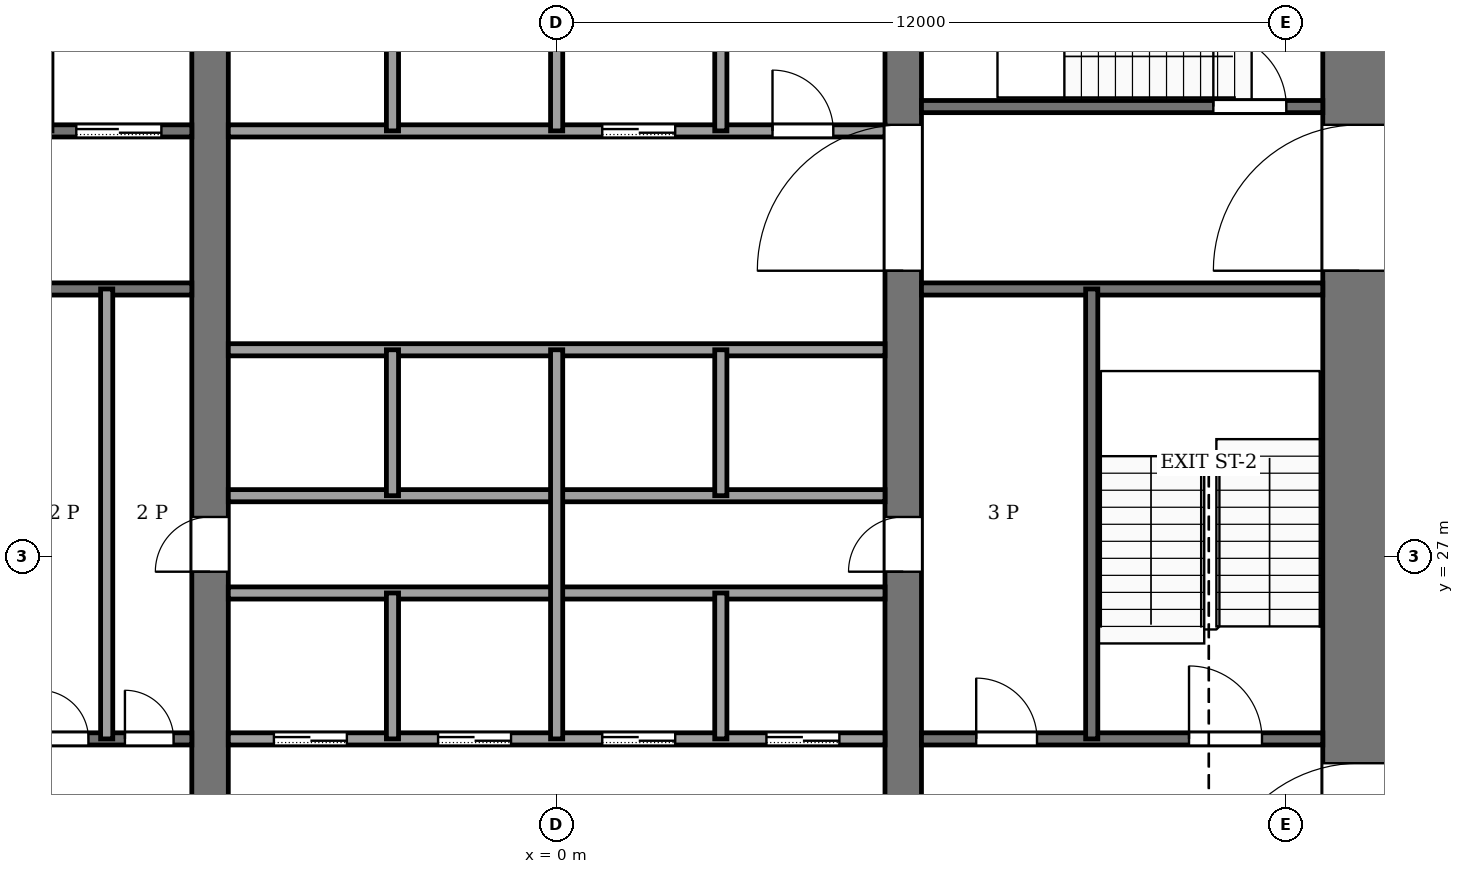
"""IFC4 building model, lengths in metres.
Left out: names, types, materials, properties, quantities, classifications, styles, units other than length and angle.
Written with IfcOpenShell. Run it as: python <this file> out.ifc"""

import sys

from ifc_helpers import new_model, si_unit, direction, frame, frame_2d, origin, place, context, subcontext, project, spatial, rectangle, extrude, element, fill, save


model = new_model("IFC4")
c1 = context("Model", 3, precision=1e-05, world=origin(), true_north=direction((0.0, 1.0)))
c2 = subcontext(c1, "Body", "Model", "MODEL_VIEW")
j1 = project(units=[si_unit("LENGTHUNIT", "METRE"), si_unit("PLANEANGLEUNIT", "RADIAN")], contexts=[c1])
p1 = place(None, origin())
s1 = spatial("IfcSite", under=j1, at=p1, CompositionType="ELEMENT")
p2 = place(p1, origin())
s2 = spatial("IfcBuilding", under=s1, at=p2, CompositionType="ELEMENT")
p3 = place(p2, frame((0.0, 0.0, 90.0)))
s3 = spatial("IfcBuildingStorey", under=s2, at=p3, CompositionType="ELEMENT", Elevation=90.0)
p4 = place(p3, frame((13.2, 18.4, -0.13), z_axis=(0.0, 0.0, 1.0), x_axis=(0.0, 1.0, 0.0)))
e1 = element("IfcWall", 1, at=p4, inside=s3, PredefinedType="SHEAR", context=c2, shape_type="SweptSolid", body=[
    extrude(rectangle(XDim=19.2, YDim=1.2, at=frame_2d((9.6, 0.0))), origin(), (0.0, 0.0, 1.0), 4.0),
])
p5 = place(p4, frame((2.8, 0.0, 0.13)))
e2 = element("IfcOpeningElement", 2, at=p5, cuts=e1, PredefinedType="OPENING", context=c2, shape_type="SweptSolid", body=[
    extrude(rectangle(XDim=2.4, YDim=2.4, at=frame_2d((1.2, 1.2))), frame((0.0, 0.61, 0.0), z_axis=(0.0, -1.0, 0.0), x_axis=(1.0, 0.0, 0.0)), (0.0, 0.0, 1.0), 1.22),
])
p6 = place(p4, frame((13.3, 0.0, 0.13)))
e3 = element("IfcOpeningElement", 3, at=p6, cuts=e1, PredefinedType="OPENING", context=c2, shape_type="SweptSolid", body=[
    extrude(rectangle(XDim=2.4, YDim=2.4, at=frame_2d((1.2, 1.2))), frame((0.0, 0.61, 0.0), z_axis=(0.0, -1.0, 0.0), x_axis=(1.0, 0.0, 0.0)), (0.0, 0.0, 1.0), 1.22),
])
p7 = place(p3, frame((-5.7, 18.4, -0.13), z_axis=(0.0, 0.0, 1.0), x_axis=(0.0, 1.0, 0.0)))
e4 = element("IfcWall", 4, at=p7, inside=s3, PredefinedType="SHEAR", context=c2, shape_type="SweptSolid", body=[
    extrude(rectangle(XDim=19.2, YDim=0.6, at=frame_2d((9.6, 0.0))), origin(), (0.0, 0.0, 1.0), 4.0),
])
p8 = place(p7, frame((8.35, 0.0, 0.13)))
e5 = element("IfcOpeningElement", 5, at=p8, cuts=e4, PredefinedType="OPENING", context=c2, shape_type="SweptSolid", body=[
    extrude(rectangle(XDim=0.9, YDim=2.1, at=frame_2d((0.45, 1.05))), frame((0.0, 0.31, 0.0), z_axis=(0.0, -1.0, 0.0), x_axis=(1.0, 0.0, 0.0)), (0.0, 0.0, 1.0), 0.62),
])
p9 = place(p3, frame((5.7, 18.4, -0.13), z_axis=(0.0, 0.0, 1.0), x_axis=(0.0, 1.0, 0.0)))
e6 = element("IfcWall", 6, at=p9, inside=s3, PredefinedType="SHEAR", context=c2, shape_type="SweptSolid", body=[
    extrude(rectangle(XDim=19.2, YDim=0.6, at=frame_2d((9.6, 0.0))), origin(), (0.0, 0.0, 1.0), 4.0),
])
p10 = place(p9, frame((8.35, 0.0, 0.13)))
e7 = element("IfcOpeningElement", 7, at=p10, cuts=e6, PredefinedType="OPENING", context=c2, shape_type="SweptSolid", body=[
    extrude(rectangle(XDim=0.9, YDim=2.1, at=frame_2d((0.45, 1.05))), frame((0.0, 0.31, 0.0), z_axis=(0.0, -1.0, 0.0), x_axis=(1.0, 0.0, 0.0)), (0.0, 0.0, 1.0), 0.62),
])
p11 = place(p9, frame((13.3, 0.0, 0.13)))
e8 = element("IfcOpeningElement", 8, at=p11, cuts=e6, PredefinedType="OPENING", context=c2, shape_type="SweptSolid", body=[
    extrude(rectangle(XDim=2.4, YDim=2.4, at=frame_2d((1.2, 1.2))), frame((0.0, 0.31, 0.0), z_axis=(0.0, -1.0, 0.0), x_axis=(1.0, 0.0, 0.0)), (0.0, 0.0, 1.0), 0.62),
])
p12 = place(p3, frame((-12.6, 24.0, 0.0), z_axis=(0.0, 0.0, 1.0), x_axis=(1.0, 0.0, 0.0)))
e9 = element("IfcWall", 9, at=p12, inside=s3, PredefinedType="PARTITIONING", context=c2, shape_type="SweptSolid", body=[
    extrude(rectangle(XDim=6.6, YDim=0.2, at=frame_2d((3.3, 0.0))), origin(), (0.0, 0.0, 1.0), 3.87),
])
p13 = place(p12, frame((4.1, 0.0, 0.0)))
e10 = element("IfcOpeningElement", 10, at=p13, cuts=e9, PredefinedType="OPENING", context=c2, shape_type="SweptSolid", body=[
    extrude(rectangle(XDim=0.8, YDim=2.1, at=frame_2d((0.4, 1.05))), frame((0.0, 0.11, 0.0), z_axis=(0.0, -1.0, 0.0), x_axis=(1.0, 0.0, 0.0)), (0.0, 0.0, 1.0), 0.22),
])
p14 = place(p12, frame((5.5, 0.0, 0.0)))
e11 = element("IfcOpeningElement", 11, at=p14, cuts=e9, PredefinedType="OPENING", context=c2, shape_type="SweptSolid", body=[
    extrude(rectangle(XDim=0.8, YDim=2.1, at=frame_2d((0.4, 1.05))), frame((0.0, 0.11, 0.0), z_axis=(0.0, -1.0, 0.0), x_axis=(1.0, 0.0, 0.0)), (0.0, 0.0, 1.0), 0.22),
])
p15 = place(p3, frame((-5.4, 24.0, 0.0), z_axis=(0.0, 0.0, 1.0), x_axis=(1.0, 0.0, 0.0)))
e12 = element("IfcWall", 12, at=p15, inside=s3, PredefinedType="PARTITIONING", context=c2, shape_type="SweptSolid", body=[
    extrude(rectangle(XDim=10.8, YDim=0.2, at=frame_2d((5.4, 0.0))), origin(), (0.0, 0.0, 1.0), 3.87),
])
p16 = place(p15, frame((0.75, 0.0, 0.0)))
e13 = element("IfcOpeningElement", 13, at=p16, cuts=e12, PredefinedType="OPENING", context=c2, shape_type="SweptSolid", body=[
    extrude(rectangle(XDim=1.2, YDim=2.2, at=frame_2d((0.6, 1.1))), frame((0.0, 0.11, 0.0), z_axis=(0.0, -1.0, 0.0), x_axis=(1.0, 0.0, 0.0)), (0.0, 0.0, 1.0), 0.22),
])
p17 = place(p15, frame((3.45, 0.0, 0.0)))
e14 = element("IfcOpeningElement", 14, at=p17, cuts=e12, PredefinedType="OPENING", context=c2, shape_type="SweptSolid", body=[
    extrude(rectangle(XDim=1.2, YDim=2.2, at=frame_2d((0.6, 1.1))), frame((0.0, 0.11, 0.0), z_axis=(0.0, -1.0, 0.0), x_axis=(1.0, 0.0, 0.0)), (0.0, 0.0, 1.0), 0.22),
])
p18 = place(p15, frame((6.15, 0.0, 0.0)))
e15 = element("IfcOpeningElement", 15, at=p18, cuts=e12, PredefinedType="OPENING", context=c2, shape_type="SweptSolid", body=[
    extrude(rectangle(XDim=1.2, YDim=2.2, at=frame_2d((0.6, 1.1))), frame((0.0, 0.11, 0.0), z_axis=(0.0, -1.0, 0.0), x_axis=(1.0, 0.0, 0.0)), (0.0, 0.0, 1.0), 0.22),
])
p19 = place(p15, frame((8.85, 0.0, 0.0)))
e16 = element("IfcOpeningElement", 16, at=p19, cuts=e12, PredefinedType="OPENING", context=c2, shape_type="SweptSolid", body=[
    extrude(rectangle(XDim=1.2, YDim=2.2, at=frame_2d((0.6, 1.1))), frame((0.0, 0.11, 0.0), z_axis=(0.0, -1.0, 0.0), x_axis=(1.0, 0.0, 0.0)), (0.0, 0.0, 1.0), 0.22),
])
p20 = place(p3, frame((6.0, 24.0, 0.0), z_axis=(0.0, 0.0, 1.0), x_axis=(1.0, 0.0, 0.0)))
e17 = element("IfcWall", 17, at=p20, inside=s3, PredefinedType="PARTITIONING", context=c2, shape_type="SweptSolid", body=[
    extrude(rectangle(XDim=6.6, YDim=0.2, at=frame_2d((3.3, 0.0))), origin(), (0.0, 0.0, 1.0), 3.87),
])
p21 = place(p20, frame((0.9, 0.0, 0.0)))
e18 = element("IfcOpeningElement", 18, at=p21, cuts=e17, PredefinedType="OPENING", context=c2, shape_type="SweptSolid", body=[
    extrude(rectangle(XDim=1.0, YDim=2.1, at=frame_2d((0.5, 1.05))), frame((0.0, 0.11, 0.0), z_axis=(0.0, -1.0, 0.0), x_axis=(1.0, 0.0, 0.0)), (0.0, 0.0, 1.0), 0.22),
])
p22 = place(p20, frame((4.4, 0.0, 0.0)))
e19 = element("IfcOpeningElement", 19, at=p22, cuts=e17, PredefinedType="OPENING", context=c2, shape_type="SweptSolid", body=[
    extrude(rectangle(XDim=1.2, YDim=2.2, at=frame_2d((0.6, 1.1))), frame((0.0, 0.11, 0.0), z_axis=(0.0, -1.0, 0.0), x_axis=(1.0, 0.0, 0.0)), (0.0, 0.0, 1.0), 0.22),
])
for number, where, z_axis, x_axis in (
    (20, (-5.4, 26.4, 0.0), (0.0, 0.0, 1.0), (1.0, 0.0, 0.0)),
    (21, (-5.4, 28.0, 0.0), (0.0, 0.0, 1.0), (1.0, 0.0, 0.0)),
    (22, (-5.4, 30.4, 0.0), (0.0, 0.0, 1.0), (1.0, 0.0, 0.0)),
):
    element("IfcWall", number, at=place(p3, frame(where, z_axis=z_axis, x_axis=x_axis)), inside=s3, PredefinedType="PARTITIONING", context=c2, shape_type="SweptSolid", body=[
        extrude(rectangle(XDim=10.8, YDim=0.2, at=frame_2d((5.4, 0.0))), origin(), (0.0, 0.0, 1.0), 3.87),
    ])
p23 = place(p3, frame((-12.6, 31.4, 0.0), z_axis=(0.0, 0.0, 1.0), x_axis=(1.0, 0.0, 0.0)))
e23 = element("IfcWall", 23, at=p23, inside=s3, PredefinedType="PARTITIONING", context=c2, shape_type="SweptSolid", body=[
    extrude(rectangle(XDim=6.6, YDim=0.2, at=frame_2d((3.3, 0.0))), origin(), (0.0, 0.0, 1.0), 3.87),
])
p24 = place(p23, frame((1.0, 0.0, 0.0)))
e24 = element("IfcOpeningElement", 24, at=p24, cuts=e23, PredefinedType="OPENING", context=c2, shape_type="SweptSolid", body=[
    extrude(rectangle(XDim=1.2, YDim=2.2, at=frame_2d((0.6, 1.1))), frame((0.0, 0.11, 0.0), z_axis=(0.0, -1.0, 0.0), x_axis=(1.0, 0.0, 0.0)), (0.0, 0.0, 1.0), 0.22),
])
p25 = place(p3, frame((6.0, 31.4, 0.0), z_axis=(0.0, 0.0, 1.0), x_axis=(1.0, 0.0, 0.0)))
e25 = element("IfcWall", 25, at=p25, inside=s3, PredefinedType="PARTITIONING", context=c2, shape_type="SweptSolid", body=[
    extrude(rectangle(XDim=6.6, YDim=0.2, at=frame_2d((3.3, 0.0))), origin(), (0.0, 0.0, 1.0), 3.87),
])
p26 = place(p3, frame((-12.6, 34.0, 0.0), z_axis=(0.0, 0.0, 1.0), x_axis=(1.0, 0.0, 0.0)))
e26 = element("IfcWall", 26, at=p26, inside=s3, PredefinedType="PARTITIONING", context=c2, shape_type="SweptSolid", body=[
    extrude(rectangle(XDim=6.6, YDim=0.2, at=frame_2d((3.3, 0.0))), origin(), (0.0, 0.0, 1.0), 3.87),
])
p27 = place(p26, frame((4.7, 0.0, 0.0)))
e27 = element("IfcOpeningElement", 27, at=p27, cuts=e26, PredefinedType="OPENING", context=c2, shape_type="SweptSolid", body=[
    extrude(rectangle(XDim=1.4, YDim=2.2, at=frame_2d((0.7, 1.1))), frame((0.0, 0.11, 0.0), z_axis=(0.0, -1.0, 0.0), x_axis=(1.0, 0.0, 0.0)), (0.0, 0.0, 1.0), 0.22),
])
p28 = place(p26, frame((2.3, 0.0, 0.0)))
e28 = element("IfcOpeningElement", 28, at=p28, cuts=e26, PredefinedType="OPENING", context=c2, shape_type="SweptSolid", body=[
    extrude(rectangle(XDim=1.4, YDim=2.2, at=frame_2d((0.7, 1.1))), frame((0.0, 0.11, 0.0), z_axis=(0.0, -1.0, 0.0), x_axis=(1.0, 0.0, 0.0)), (0.0, 0.0, 1.0), 0.22),
])
p29 = place(p26, frame((0.45, 0.0, 0.0)))
e29 = element("IfcOpeningElement", 29, at=p29, cuts=e26, PredefinedType="OPENING", context=c2, shape_type="SweptSolid", body=[
    extrude(rectangle(XDim=0.9, YDim=2.1, at=frame_2d((0.45, 1.05))), frame((0.0, 0.11, 0.0), z_axis=(0.0, -1.0, 0.0), x_axis=(1.0, 0.0, 0.0)), (0.0, 0.0, 1.0), 0.22),
])
p30 = place(p3, frame((-5.4, 34.0, 0.0), z_axis=(0.0, 0.0, 1.0), x_axis=(1.0, 0.0, 0.0)))
e30 = element("IfcWall", 30, at=p30, inside=s3, PredefinedType="PARTITIONING", context=c2, shape_type="SweptSolid", body=[
    extrude(rectangle(XDim=10.8, YDim=0.2, at=frame_2d((5.4, 0.0))), origin(), (0.0, 0.0, 1.0), 3.87),
])
p31 = place(p30, frame((6.15, 0.0, 0.0)))
e31 = element("IfcOpeningElement", 31, at=p31, cuts=e30, PredefinedType="OPENING", context=c2, shape_type="SweptSolid", body=[
    extrude(rectangle(XDim=1.2, YDim=2.2, at=frame_2d((0.6, 1.1))), frame((0.0, 0.11, 0.0), z_axis=(0.0, -1.0, 0.0), x_axis=(1.0, 0.0, 0.0)), (0.0, 0.0, 1.0), 0.22),
])
p32 = place(p30, frame((8.95, 0.0, 0.0)))
e32 = element("IfcOpeningElement", 32, at=p32, cuts=e30, PredefinedType="OPENING", context=c2, shape_type="SweptSolid", body=[
    extrude(rectangle(XDim=1.0, YDim=2.1, at=frame_2d((0.5, 1.05))), frame((0.0, 0.11, 0.0), z_axis=(0.0, -1.0, 0.0), x_axis=(1.0, 0.0, 0.0)), (0.0, 0.0, 1.0), 0.22),
])
p33 = place(p3, frame((6.0, 34.4, 0.0), z_axis=(0.0, 0.0, 1.0), x_axis=(1.0, 0.0, 0.0)))
e33 = element("IfcWall", 33, at=p33, inside=s3, PredefinedType="PARTITIONING", context=c2, shape_type="SweptSolid", body=[
    extrude(rectangle(XDim=6.6, YDim=0.2, at=frame_2d((3.3, 0.0))), origin(), (0.0, 0.0, 1.0), 3.87),
])
p34 = place(p33, frame((4.8, 0.0, 0.0)))
e34 = element("IfcOpeningElement", 34, at=p34, cuts=e33, PredefinedType="OPENING", context=c2, shape_type="SweptSolid", body=[
    extrude(rectangle(XDim=1.2, YDim=2.2, at=frame_2d((0.6, 1.1))), frame((0.0, 0.11, 0.0), z_axis=(0.0, -1.0, 0.0), x_axis=(1.0, 0.0, 0.0)), (0.0, 0.0, 1.0), 0.22),
])
p35 = place(p3, frame((-8.4, 34.0, 0.0), z_axis=(0.0, 0.0, 1.0), x_axis=(0.0, 1.0, 0.0)))
e35 = element("IfcWall", 35, at=p35, inside=s3, PredefinedType="PARTITIONING", context=c2, shape_type="SweptSolid", body=[
    extrude(rectangle(XDim=3.6, YDim=0.2, at=frame_2d((1.8, 0.0))), origin(), (0.0, 0.0, 1.0), 3.87),
])
p36 = place(p3, frame((-7.4, 24.0, 0.0), z_axis=(0.0, 0.0, 1.0), x_axis=(0.0, 1.0, 0.0)))
e36 = element("IfcWall", 36, at=p36, inside=s3, PredefinedType="PARTITIONING", context=c2, shape_type="SweptSolid", body=[
    extrude(rectangle(XDim=7.4, YDim=0.2, at=frame_2d((3.7, 0.0))), origin(), (0.0, 0.0, 1.0), 3.87),
])
for number, where, z_axis, x_axis in (
    (37, (-2.7, 24.0, 0.0), (0.0, 0.0, 1.0), (0.0, 1.0, 0.0)),
    (38, (-2.7, 28.0, 0.0), (0.0, 0.0, 1.0), (0.0, 1.0, 0.0)),
):
    element("IfcWall", number, at=place(p3, frame(where, z_axis=z_axis, x_axis=x_axis)), inside=s3, PredefinedType="PARTITIONING", context=c2, shape_type="SweptSolid", body=[
        extrude(rectangle(XDim=2.4, YDim=0.2, at=frame_2d((1.2, 0.0))), origin(), (0.0, 0.0, 1.0), 3.87),
    ])
p37 = place(p3, frame((-2.7, 34.0, 0.0), z_axis=(0.0, 0.0, 1.0), x_axis=(0.0, 1.0, 0.0)))
e39 = element("IfcWall", 39, at=p37, inside=s3, PredefinedType="PARTITIONING", context=c2, shape_type="SweptSolid", body=[
    extrude(rectangle(XDim=3.6, YDim=0.2, at=frame_2d((1.8, 0.0))), origin(), (0.0, 0.0, 1.0), 3.87),
])
p38 = place(p3, frame((0.0, 24.0, 0.0), z_axis=(0.0, 0.0, 1.0), x_axis=(0.0, 1.0, 0.0)))
e40 = element("IfcWall", 40, at=p38, inside=s3, PredefinedType="PARTITIONING", context=c2, shape_type="SweptSolid", body=[
    extrude(rectangle(XDim=6.4, YDim=0.2, at=frame_2d((3.2, 0.0))), origin(), (0.0, 0.0, 1.0), 3.87),
])
p39 = place(p3, frame((0.0, 34.0, 0.0), z_axis=(0.0, 0.0, 1.0), x_axis=(0.0, 1.0, 0.0)))
e41 = element("IfcWall", 41, at=p39, inside=s3, PredefinedType="PARTITIONING", context=c2, shape_type="SweptSolid", body=[
    extrude(rectangle(XDim=3.6, YDim=0.2, at=frame_2d((1.8, 0.0))), origin(), (0.0, 0.0, 1.0), 3.87),
])
for number, where, z_axis, x_axis in (
    (42, (2.7, 24.0, 0.0), (0.0, 0.0, 1.0), (0.0, 1.0, 0.0)),
    (43, (2.7, 28.0, 0.0), (0.0, 0.0, 1.0), (0.0, 1.0, 0.0)),
):
    element("IfcWall", number, at=place(p3, frame(where, z_axis=z_axis, x_axis=x_axis)), inside=s3, PredefinedType="PARTITIONING", context=c2, shape_type="SweptSolid", body=[
        extrude(rectangle(XDim=2.4, YDim=0.2, at=frame_2d((1.2, 0.0))), origin(), (0.0, 0.0, 1.0), 3.87),
    ])
p40 = place(p3, frame((2.7, 34.0, 0.0), z_axis=(0.0, 0.0, 1.0), x_axis=(0.0, 1.0, 0.0)))
e44 = element("IfcWall", 44, at=p40, inside=s3, PredefinedType="PARTITIONING", context=c2, shape_type="SweptSolid", body=[
    extrude(rectangle(XDim=3.6, YDim=0.2, at=frame_2d((1.8, 0.0))), origin(), (0.0, 0.0, 1.0), 3.87),
])
p41 = place(p3, frame((8.8, 24.0, 0.0), z_axis=(0.0, 0.0, 1.0), x_axis=(0.0, 1.0, 0.0)))
e45 = element("IfcWall", 45, at=p41, inside=s3, PredefinedType="PARTITIONING", context=c2, shape_type="SweptSolid", body=[
    extrude(rectangle(XDim=7.4, YDim=0.2, at=frame_2d((3.7, 0.0))), origin(), (0.0, 0.0, 1.0), 3.87),
])
p42 = place(p16, origin())
e46 = element("IfcDoor", 46, at=p42, inside=s3, OperationType="SLIDING_TO_LEFT", PredefinedType="DOOR", context=c2, shape_type="SweptSolid", body=[
    extrude(rectangle(XDim=1.2, YDim=2.2, at=frame_2d((0.6, 1.1))), frame((0.0, 0.025, 0.0), z_axis=(0.0, -1.0, 0.0), x_axis=(1.0, 0.0, 0.0)), (0.0, 0.0, 1.0), 0.05),
])
fill(e13, e46)
p43 = place(p17, origin())
e47 = element("IfcDoor", 47, at=p43, inside=s3, OperationType="SLIDING_TO_LEFT", PredefinedType="DOOR", context=c2, shape_type="SweptSolid", body=[
    extrude(rectangle(XDim=1.2, YDim=2.2, at=frame_2d((0.6, 1.1))), frame((0.0, 0.025, 0.0), z_axis=(0.0, -1.0, 0.0), x_axis=(1.0, 0.0, 0.0)), (0.0, 0.0, 1.0), 0.05),
])
fill(e14, e47)
p44 = place(p18, origin())
e48 = element("IfcDoor", 48, at=p44, inside=s3, OperationType="SLIDING_TO_LEFT", PredefinedType="DOOR", context=c2, shape_type="SweptSolid", body=[
    extrude(rectangle(XDim=1.2, YDim=2.2, at=frame_2d((0.6, 1.1))), frame((0.0, 0.025, 0.0), z_axis=(0.0, -1.0, 0.0), x_axis=(1.0, 0.0, 0.0)), (0.0, 0.0, 1.0), 0.05),
])
fill(e15, e48)
p45 = place(p19, origin())
e49 = element("IfcDoor", 49, at=p45, inside=s3, OperationType="SLIDING_TO_LEFT", PredefinedType="DOOR", context=c2, shape_type="SweptSolid", body=[
    extrude(rectangle(XDim=1.2, YDim=2.2, at=frame_2d((0.6, 1.1))), frame((0.0, 0.025, 0.0), z_axis=(0.0, -1.0, 0.0), x_axis=(1.0, 0.0, 0.0)), (0.0, 0.0, 1.0), 0.05),
])
fill(e16, e49)
p46 = place(p31, origin())
e50 = element("IfcDoor", 50, at=p46, inside=s3, OperationType="SLIDING_TO_LEFT", PredefinedType="DOOR", context=c2, shape_type="SweptSolid", body=[
    extrude(rectangle(XDim=1.2, YDim=2.2, at=frame_2d((0.6, 1.1))), frame((0.0, 0.025, 0.0), z_axis=(0.0, -1.0, 0.0), x_axis=(1.0, 0.0, 0.0)), (0.0, 0.0, 1.0), 0.05),
])
fill(e31, e50)
p47 = place(p27, origin())
e51 = element("IfcDoor", 51, at=p47, inside=s3, OperationType="SLIDING_TO_LEFT", PredefinedType="DOOR", context=c2, shape_type="SweptSolid", body=[
    extrude(rectangle(XDim=1.4, YDim=2.2, at=frame_2d((0.7, 1.1))), frame((0.0, 0.025, 0.0), z_axis=(0.0, -1.0, 0.0), x_axis=(1.0, 0.0, 0.0)), (0.0, 0.0, 1.0), 0.05),
])
fill(e27, e51)
p48 = place(p13, origin())
e52 = element("IfcDoor", 52, at=p48, inside=s3, OperationType="SINGLE_SWING_LEFT", PredefinedType="DOOR", context=c2, shape_type="SweptSolid", body=[
    extrude(rectangle(XDim=0.8, YDim=2.1, at=frame_2d((0.4, 1.05))), frame((0.0, 0.025, 0.0), z_axis=(0.0, -1.0, 0.0), x_axis=(1.0, 0.0, 0.0)), (0.0, 0.0, 1.0), 0.05),
])
fill(e10, e52)
p49 = place(p14, origin())
e53 = element("IfcDoor", 53, at=p49, inside=s3, OperationType="SINGLE_SWING_RIGHT", PredefinedType="DOOR", context=c2, shape_type="SweptSolid", body=[
    extrude(rectangle(XDim=0.8, YDim=2.1, at=frame_2d((0.4, 1.05))), frame((0.0, 0.025, 0.0), z_axis=(0.0, -1.0, 0.0), x_axis=(1.0, 0.0, 0.0)), (0.0, 0.0, 1.0), 0.05),
])
fill(e11, e53)
p50 = place(p21, origin())
e54 = element("IfcDoor", 54, at=p50, inside=s3, OperationType="SINGLE_SWING_RIGHT", PredefinedType="DOOR", context=c2, shape_type="SweptSolid", body=[
    extrude(rectangle(XDim=1.0, YDim=2.1, at=frame_2d((0.5, 1.05))), frame((0.0, 0.025, 0.0), z_axis=(0.0, -1.0, 0.0), x_axis=(1.0, 0.0, 0.0)), (0.0, 0.0, 1.0), 0.05),
])
fill(e18, e54)
p51 = place(p32, origin())
e55 = element("IfcDoor", 55, at=p51, inside=s3, OperationType="SINGLE_SWING_LEFT", PredefinedType="DOOR", context=c2, shape_type="SweptSolid", body=[
    extrude(rectangle(XDim=1.0, YDim=2.1, at=frame_2d((0.5, 1.05))), frame((0.0, 0.025, 0.0), z_axis=(0.0, -1.0, 0.0), x_axis=(1.0, 0.0, 0.0)), (0.0, 0.0, 1.0), 0.05),
])
fill(e32, e55)
p52 = place(p8, origin())
e56 = element("IfcDoor", 56, at=p52, inside=s3, OperationType="SINGLE_SWING_LEFT", PredefinedType="DOOR", context=c2, shape_type="SweptSolid", body=[
    extrude(rectangle(XDim=0.9, YDim=2.1, at=frame_2d((0.45, 1.05))), frame((0.0, 0.025, 0.0), z_axis=(0.0, -1.0, 0.0), x_axis=(1.0, 0.0, 0.0)), (0.0, 0.0, 1.0), 0.05),
])
fill(e5, e56)
p53 = place(p10, origin())
e57 = element("IfcDoor", 57, at=p53, inside=s3, OperationType="SINGLE_SWING_RIGHT", PredefinedType="DOOR", context=c2, shape_type="SweptSolid", body=[
    extrude(rectangle(XDim=0.9, YDim=2.1, at=frame_2d((0.45, 1.05))), frame((0.0, 0.025, 0.0), z_axis=(0.0, -1.0, 0.0), x_axis=(1.0, 0.0, 0.0)), (0.0, 0.0, 1.0), 0.05),
])
fill(e7, e57)
p54 = place(p22, origin())
e58 = element("IfcDoor", 58, at=p54, inside=s3, OperationType="SINGLE_SWING_LEFT", PredefinedType="DOOR", context=c2, shape_type="SweptSolid", body=[
    extrude(rectangle(XDim=1.2, YDim=2.2, at=frame_2d((0.6, 1.1))), frame((0.0, 0.025, 0.0), z_axis=(0.0, -1.0, 0.0), x_axis=(1.0, 0.0, 0.0)), (0.0, 0.0, 1.0), 0.05),
])
fill(e19, e58)
p55 = place(p34, origin())
e59 = element("IfcDoor", 59, at=p55, inside=s3, OperationType="SINGLE_SWING_RIGHT", PredefinedType="DOOR", context=c2, shape_type="SweptSolid", body=[
    extrude(rectangle(XDim=1.2, YDim=2.2, at=frame_2d((0.6, 1.1))), frame((0.0, 0.025, 0.0), z_axis=(0.0, -1.0, 0.0), x_axis=(1.0, 0.0, 0.0)), (0.0, 0.0, 1.0), 0.05),
])
fill(e34, e59)
p56 = place(p11, origin())
e60 = element("IfcDoor", 60, at=p56, inside=s3, OperationType="DOUBLE_DOOR_SINGLE_SWING", PredefinedType="DOOR", context=c2, shape_type="SweptSolid", body=[
    extrude(rectangle(XDim=2.4, YDim=2.4, at=frame_2d((1.2, 1.2))), frame((0.0, 0.025, 0.0), z_axis=(0.0, -1.0, 0.0), x_axis=(1.0, 0.0, 0.0)), (0.0, 0.0, 1.0), 0.05),
])
fill(e8, e60)
p57 = place(p5, origin())
e61 = element("IfcDoor", 61, at=p57, inside=s3, OperationType="DOUBLE_DOOR_SINGLE_SWING", PredefinedType="DOOR", context=c2, shape_type="SweptSolid", body=[
    extrude(rectangle(XDim=2.4, YDim=2.4, at=frame_2d((1.2, 1.2))), frame((0.0, 0.025, 0.0), z_axis=(0.0, -1.0, 0.0), x_axis=(1.0, 0.0, 0.0)), (0.0, 0.0, 1.0), 0.05),
])
fill(e2, e61)
p58 = place(p6, origin())
e62 = element("IfcDoor", 62, at=p58, inside=s3, OperationType="DOUBLE_DOOR_SINGLE_SWING", PredefinedType="DOOR", context=c2, shape_type="SweptSolid", body=[
    extrude(rectangle(XDim=2.4, YDim=2.4, at=frame_2d((1.2, 1.2))), frame((0.0, 0.025, 0.0), z_axis=(0.0, -1.0, 0.0), x_axis=(1.0, 0.0, 0.0)), (0.0, 0.0, 1.0), 0.05),
])
fill(e3, e62)
save(model, sys.argv[1])
